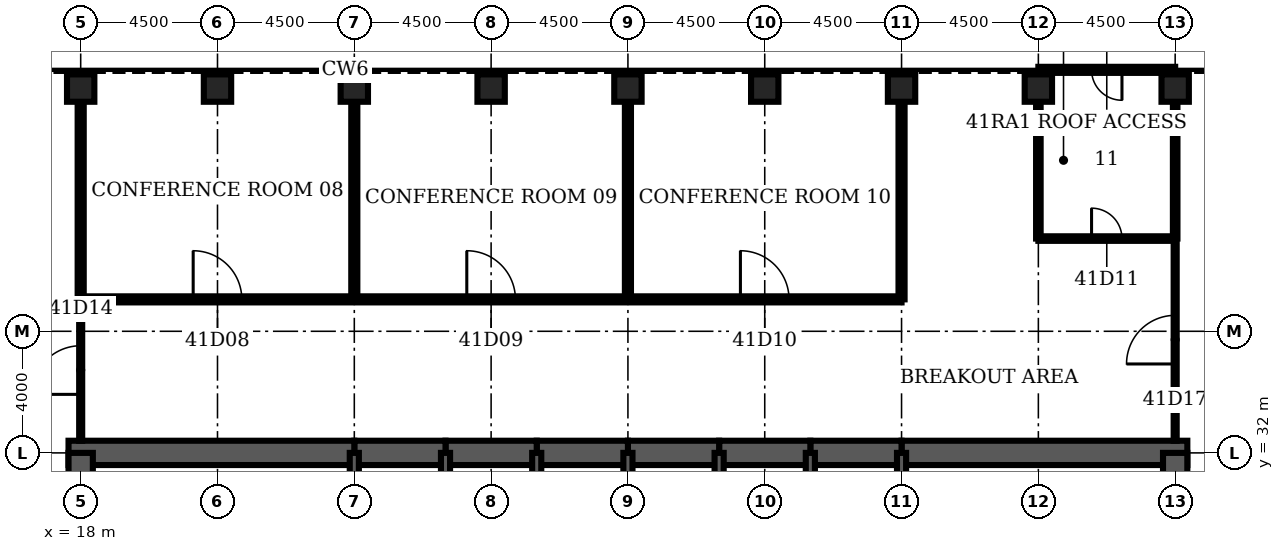
"""IFC4 building model, lengths in metres.
Left out: names, types, materials, properties, quantities, classifications, styles, units other than length and angle.
Written with IfcOpenShell. Run it as: python <this file> out.ifc"""

import sys

from ifc_helpers import new_model, si_unit, direction, frame, frame_2d, origin, origin_2d, place, context, subcontext, project, spatial, rectangle, hollow_rectangle, extrude, element, fill, save


model = new_model("IFC4")
c1 = context("Model", 3, precision=1e-05, world=origin(), true_north=direction((0.0, 1.0)))
c2 = subcontext(c1, "Body", "Model", "MODEL_VIEW")
j1 = project(units=[si_unit("LENGTHUNIT", "METRE"), si_unit("PLANEANGLEUNIT", "RADIAN")], contexts=[c1])
p1 = place(None, origin())
s1 = spatial("IfcSite", under=j1, at=p1, CompositionType="ELEMENT")
p2 = place(p1, origin())
s2 = spatial("IfcBuilding", under=s1, at=p2, CompositionType="ELEMENT")
p3 = place(p2, frame((0.0, 0.0, 185.8)))
s3 = spatial("IfcBuildingStorey", under=s2, at=p3, CompositionType="ELEMENT", Elevation=185.8)
for number, where, z_axis, x_axis in (
    (1, (54.0, 44.0, 0.0), (0.0, 0.0, 1.0), (0.0, 1.0, 0.0)),
    (2, (49.5, 44.0, 0.0), (0.0, 0.0, 1.0), (0.0, 1.0, 0.0)),
    (3, (45.0, 44.0, 0.0), (0.0, 0.0, 1.0), (0.0, 1.0, 0.0)),
    (4, (40.5, 44.0, 0.0), (0.0, 0.0, 1.0), (0.0, 1.0, 0.0)),
    (5, (36.0, 44.0, 0.0), (0.0, 0.0, 1.0), (0.0, 1.0, 0.0)),
    (6, (31.5, 44.0, 0.0), (0.0, 0.0, 1.0), (0.0, 1.0, 0.0)),
    (7, (27.0, 44.0, 0.0), (0.0, 0.0, 1.0), (0.0, 1.0, 0.0)),
    (8, (22.5, 44.0, 0.0), (0.0, 0.0, 1.0), (0.0, 1.0, 0.0)),
    (9, (18.0, 44.0, 0.0), (0.0, 0.0, 1.0), (0.0, 1.0, 0.0)),
):
    element("IfcColumn", number, at=place(p3, frame(where, z_axis=z_axis, x_axis=x_axis)), inside=s3, PredefinedType="COLUMN", context=c2, shape_type="SweptSolid", body=[
        extrude(hollow_rectangle(XDim=0.9, YDim=0.9, WallThickness=0.09, at=origin_2d()), origin(), (0.0, 0.0, 1.0), 4.2),
    ])
p4 = place(p3, frame((54.4, 32.0, 0.0), z_axis=(0.0, 0.0, 1.0), x_axis=(-1.0, 0.0, 0.0)))
e10 = element("IfcWall", 10, at=p4, inside=s3, PredefinedType="SHEAR", context=c2, shape_type="SweptSolid", body=[
    extrude(rectangle(XDim=9.4, YDim=0.8, at=frame_2d((4.7, 0.0))), origin(), (0.0, 0.0, 1.0), 4.2),
])
for number, where, z_axis, x_axis in (
    (11, (45.0, 32.0, 0.0), (0.0, 0.0, 1.0), (-1.0, 0.0, 0.0)),
    (12, (42.0, 32.0, 0.0), (0.0, 0.0, 1.0), (-1.0, 0.0, 0.0)),
    (13, (39.0, 32.0, 0.0), (0.0, 0.0, 1.0), (-1.0, 0.0, 0.0)),
    (14, (36.0, 32.0, 0.0), (0.0, 0.0, 1.0), (-1.0, 0.0, 0.0)),
    (15, (33.0, 32.0, 0.0), (0.0, 0.0, 1.0), (-1.0, 0.0, 0.0)),
    (16, (30.0, 32.0, 0.0), (0.0, 0.0, 1.0), (-1.0, 0.0, 0.0)),
):
    element("IfcWall", number, at=place(p3, frame(where, z_axis=z_axis, x_axis=x_axis)), inside=s3, PredefinedType="SHEAR", context=c2, shape_type="SweptSolid", body=[
        extrude(rectangle(XDim=3.0, YDim=0.8, at=frame_2d((1.5, 0.0))), origin(), (0.0, 0.0, 1.0), 4.2),
    ])
p5 = place(p3, frame((27.0, 32.0, 0.0), z_axis=(0.0, 0.0, 1.0), x_axis=(-1.0, 0.0, 0.0)))
e17 = element("IfcWall", 17, at=p5, inside=s3, PredefinedType="SHEAR", context=c2, shape_type="SweptSolid", body=[
    extrude(rectangle(XDim=9.4, YDim=0.8, at=frame_2d((4.7, 0.0))), origin(), (0.0, 0.0, 1.0), 4.2),
])
for number, where, z_axis, x_axis in (
    (18, (18.0, 32.0, 0.0), (0.0, 0.0, 1.0), (0.0, -1.0, 0.0)),
    (19, (54.0, 28.8, 0.0), (0.0, 0.0, 1.0), (0.0, 1.0, 0.0)),
):
    element("IfcWall", number, at=place(p3, frame(where, z_axis=z_axis, x_axis=x_axis)), inside=s3, PredefinedType="SHEAR", context=c2, shape_type="SweptSolid", body=[
        extrude(rectangle(XDim=3.2, YDim=0.8, at=frame_2d((1.6, 0.0))), origin(), (0.0, 0.0, 1.0), 4.2),
    ])
for number, where, z_axis, x_axis in (
    (20, (27.0, 28.8, 0.0), (0.0, 0.0, 1.0), (0.0, 1.0, 0.0)),
    (21, (30.0, 28.8, 0.0), (0.0, 0.0, 1.0), (0.0, 1.0, 0.0)),
    (22, (33.0, 28.8, 0.0), (0.0, 0.0, 1.0), (0.0, 1.0, 0.0)),
    (23, (36.0, 28.8, 0.0), (0.0, 0.0, 1.0), (0.0, 1.0, 0.0)),
    (24, (39.0, 28.8, 0.0), (0.0, 0.0, 1.0), (0.0, 1.0, 0.0)),
    (25, (42.0, 28.8, 0.0), (0.0, 0.0, 1.0), (0.0, 1.0, 0.0)),
    (26, (45.0, 28.8, 0.0), (0.0, 0.0, 1.0), (0.0, 1.0, 0.0)),
):
    element("IfcWall", number, at=place(p3, frame(where, z_axis=z_axis, x_axis=x_axis)), inside=s3, PredefinedType="SOLIDWALL", context=c2, shape_type="SweptSolid", body=[
        extrude(rectangle(XDim=3.2, YDim=0.3, at=frame_2d((1.6, 0.0))), origin(), (0.0, 0.0, 1.0), 4.2),
    ])
p6 = place(p3, frame((18.0, 37.05, 0.0), z_axis=(0.0, 0.0, 1.0), x_axis=(1.0, 0.0, 0.0)))
e27 = element("IfcWall", 27, at=p6, inside=s3, PredefinedType="PARTITIONING", context=c2, shape_type="SweptSolid", body=[
    extrude(rectangle(XDim=27.0, YDim=0.2, at=frame_2d((13.5, 0.0))), origin(), (0.0, 0.0, 1.0), 3.0),
])
p7 = place(p6, frame((3.7, 0.0, 0.0)))
e28 = element("IfcOpeningElement", 28, at=p7, cuts=e27, PredefinedType="OPENING", context=c2, shape_type="SweptSolid", body=[
    extrude(rectangle(XDim=1.6, YDim=2.1, at=frame_2d((0.8, 1.05))), frame((0.0, 0.11, 0.0), z_axis=(0.0, -1.0, 0.0), x_axis=(1.0, 0.0, 0.0)), (0.0, 0.0, 1.0), 0.22),
])
p8 = place(p6, frame((12.7, 0.0, 0.0)))
e29 = element("IfcOpeningElement", 29, at=p8, cuts=e27, PredefinedType="OPENING", context=c2, shape_type="SweptSolid", body=[
    extrude(rectangle(XDim=1.6, YDim=2.1, at=frame_2d((0.8, 1.05))), frame((0.0, 0.11, 0.0), z_axis=(0.0, -1.0, 0.0), x_axis=(1.0, 0.0, 0.0)), (0.0, 0.0, 1.0), 0.22),
])
p9 = place(p6, frame((21.7, 0.0, 0.0)))
e30 = element("IfcOpeningElement", 30, at=p9, cuts=e27, PredefinedType="OPENING", context=c2, shape_type="SweptSolid", body=[
    extrude(rectangle(XDim=1.6, YDim=2.1, at=frame_2d((0.8, 1.05))), frame((0.0, 0.11, 0.0), z_axis=(0.0, -1.0, 0.0), x_axis=(1.0, 0.0, 0.0)), (0.0, 0.0, 1.0), 0.22),
])
p10 = place(p3, frame((49.5, 39.05, 0.0), z_axis=(0.0, 0.0, 1.0), x_axis=(1.0, 0.0, 0.0)))
e31 = element("IfcWall", 31, at=p10, inside=s3, PredefinedType="PARTITIONING", context=c2, shape_type="SweptSolid", body=[
    extrude(rectangle(XDim=4.5, YDim=0.15, at=frame_2d((2.25, 0.0))), origin(), (0.0, 0.0, 1.0), 3.0),
])
p11 = place(p10, frame((1.75, 0.0, 0.0)))
e32 = element("IfcOpeningElement", 32, at=p11, cuts=e31, PredefinedType="OPENING", context=c2, shape_type="SweptSolid", body=[
    extrude(rectangle(XDim=1.0, YDim=2.1, at=frame_2d((0.5, 1.05))), frame((0.0, 0.085, 0.0), z_axis=(0.0, -1.0, 0.0), x_axis=(1.0, 0.0, 0.0)), (0.0, 0.0, 1.0), 0.17),
])
p12 = place(p3, frame((18.0, 32.4, 0.0), z_axis=(0.0, 0.0, 1.0), x_axis=(0.0, 1.0, 0.0)))
e33 = element("IfcWall", 33, at=p12, inside=s3, PredefinedType="PARTITIONING", context=c2, shape_type="SweptSolid", body=[
    extrude(rectangle(XDim=4.65, YDim=0.1, at=frame_2d((2.325, 0.0))), origin(), (0.0, 0.0, 1.0), 3.0),
])
p13 = place(p12, frame((1.525, 0.0, 0.0)))
e34 = element("IfcOpeningElement", 34, at=p13, cuts=e33, PredefinedType="OPENING", context=c2, shape_type="SweptSolid", body=[
    extrude(rectangle(XDim=1.6, YDim=2.1, at=frame_2d((0.8, 1.05))), frame((0.0, 0.06, 0.0), z_axis=(0.0, -1.0, 0.0), x_axis=(1.0, 0.0, 0.0)), (0.0, 0.0, 1.0), 0.12),
])
for number, where, z_axis, x_axis in (
    (35, (18.0, 37.05, 0.0), (0.0, 0.0, 1.0), (0.0, 1.0, 0.0)),
    (36, (27.0, 37.05, 0.0), (0.0, 0.0, 1.0), (0.0, 1.0, 0.0)),
    (37, (36.0, 37.05, 0.0), (0.0, 0.0, 1.0), (0.0, 1.0, 0.0)),
    (38, (45.0, 37.05, 0.0), (0.0, 0.0, 1.0), (0.0, 1.0, 0.0)),
):
    element("IfcWall", number, at=place(p3, frame(where, z_axis=z_axis, x_axis=x_axis)), inside=s3, PredefinedType="PARTITIONING", context=c2, shape_type="SweptSolid", body=[
        extrude(rectangle(XDim=6.5, YDim=0.2, at=frame_2d((3.25, 0.0))), origin(), (0.0, 0.0, 1.0), 3.0),
    ])
p14 = place(p3, frame((49.5, 39.05, 0.0), z_axis=(0.0, 0.0, 1.0), x_axis=(0.0, 1.0, 0.0)))
e39 = element("IfcWall", 39, at=p14, inside=s3, PredefinedType="PARTITIONING", context=c2, shape_type="SweptSolid", body=[
    extrude(rectangle(XDim=4.5, YDim=0.15, at=frame_2d((2.25, 0.0))), origin(), (0.0, 0.0, 1.0), 3.0),
])
p15 = place(p3, frame((54.0, 32.4, 0.0), z_axis=(0.0, 0.0, 1.0), x_axis=(0.0, 1.0, 0.0)))
e40 = element("IfcWall", 40, at=p15, inside=s3, PredefinedType="PARTITIONING", context=c2, shape_type="SweptSolid", body=[
    extrude(rectangle(XDim=6.65, YDim=0.1, at=frame_2d((3.325, 0.0))), origin(), (0.0, 0.0, 1.0), 3.0),
])
p16 = place(p15, frame((2.525, 0.0, 0.0)))
e41 = element("IfcOpeningElement", 41, at=p16, cuts=e40, PredefinedType="OPENING", context=c2, shape_type="SweptSolid", body=[
    extrude(rectangle(XDim=1.6, YDim=2.1, at=frame_2d((0.8, 1.05))), frame((0.0, 0.06, 0.0), z_axis=(0.0, -1.0, 0.0), x_axis=(1.0, 0.0, 0.0)), (0.0, 0.0, 1.0), 0.12),
])
p17 = place(p3, frame((54.0, 39.05, 0.0), z_axis=(0.0, 0.0, 1.0), x_axis=(0.0, 1.0, 0.0)))
e42 = element("IfcWall", 42, at=p17, inside=s3, PredefinedType="PARTITIONING", context=c2, shape_type="SweptSolid", body=[
    extrude(rectangle(XDim=4.5, YDim=0.15, at=frame_2d((2.25, 0.0))), origin(), (0.0, 0.0, 1.0), 3.0),
])
p18 = place(p3, frame((54.0, 44.6, 0.0), z_axis=(0.0, 0.0, 1.0), x_axis=(-1.0, 0.0, 0.0)))
e43 = element("IfcWall", 43, at=p18, inside=s3, PredefinedType="SOLIDWALL", context=c2, shape_type="SweptSolid", body=[
    extrude(rectangle(XDim=4.5, YDim=0.2, at=frame_2d((2.25, 0.0))), origin(), (0.0, 0.0, 1.0), 4.04),
])
p19 = place(p18, frame((1.75, 0.0, 0.0)))
e44 = element("IfcOpeningElement", 44, at=p19, cuts=e43, PredefinedType="OPENING", context=c2, shape_type="SweptSolid", body=[
    extrude(rectangle(XDim=1.0, YDim=2.1, at=frame_2d((0.5, 1.05))), frame((0.0, 0.11, 0.0), z_axis=(0.0, -1.0, 0.0), x_axis=(1.0, 0.0, 0.0)), (0.0, 0.0, 1.0), 0.22),
])
p20 = place(p7, origin())
e45 = element("IfcDoor", 45, at=p20, inside=s3, OperationType="SINGLE_SWING_LEFT", PredefinedType="DOOR", context=c2, shape_type="SweptSolid", body=[
    extrude(rectangle(XDim=1.6, YDim=2.1, at=frame_2d((0.8, 1.05))), frame((0.0, 0.025, 0.0), z_axis=(0.0, -1.0, 0.0), x_axis=(1.0, 0.0, 0.0)), (0.0, 0.0, 1.0), 0.05),
])
fill(e28, e45)
p21 = place(p8, origin())
e46 = element("IfcDoor", 46, at=p21, inside=s3, OperationType="SINGLE_SWING_LEFT", PredefinedType="DOOR", context=c2, shape_type="SweptSolid", body=[
    extrude(rectangle(XDim=1.6, YDim=2.1, at=frame_2d((0.8, 1.05))), frame((0.0, 0.025, 0.0), z_axis=(0.0, -1.0, 0.0), x_axis=(1.0, 0.0, 0.0)), (0.0, 0.0, 1.0), 0.05),
])
fill(e29, e46)
p22 = place(p9, origin())
e47 = element("IfcDoor", 47, at=p22, inside=s3, OperationType="SINGLE_SWING_LEFT", PredefinedType="DOOR", context=c2, shape_type="SweptSolid", body=[
    extrude(rectangle(XDim=1.6, YDim=2.1, at=frame_2d((0.8, 1.05))), frame((0.0, 0.025, 0.0), z_axis=(0.0, -1.0, 0.0), x_axis=(1.0, 0.0, 0.0)), (0.0, 0.0, 1.0), 0.05),
])
fill(e30, e47)
p23 = place(p11, origin())
e48 = element("IfcDoor", 48, at=p23, inside=s3, OperationType="SINGLE_SWING_LEFT", PredefinedType="DOOR", context=c2, shape_type="SweptSolid", body=[
    extrude(rectangle(XDim=1.0, YDim=2.1, at=frame_2d((0.5, 1.05))), frame((0.0, 0.025, 0.0), z_axis=(0.0, -1.0, 0.0), x_axis=(1.0, 0.0, 0.0)), (0.0, 0.0, 1.0), 0.05),
])
fill(e32, e48)
p24 = place(p13, origin())
e49 = element("IfcDoor", 49, at=p24, inside=s3, OperationType="SINGLE_SWING_LEFT", PredefinedType="DOOR", context=c2, shape_type="SweptSolid", body=[
    extrude(rectangle(XDim=1.6, YDim=2.1, at=frame_2d((0.8, 1.05))), frame((0.0, 0.025, 0.0), z_axis=(0.0, -1.0, 0.0), x_axis=(1.0, 0.0, 0.0)), (0.0, 0.0, 1.0), 0.05),
])
fill(e34, e49)
p25 = place(p16, origin())
e50 = element("IfcDoor", 50, at=p25, inside=s3, OperationType="SINGLE_SWING_LEFT", PredefinedType="DOOR", context=c2, shape_type="SweptSolid", body=[
    extrude(rectangle(XDim=1.6, YDim=2.1, at=frame_2d((0.8, 1.05))), frame((0.0, 0.025, 0.0), z_axis=(0.0, -1.0, 0.0), x_axis=(1.0, 0.0, 0.0)), (0.0, 0.0, 1.0), 0.05),
])
fill(e41, e50)
p26 = place(p19, origin())
e51 = element("IfcDoor", 51, at=p26, inside=s3, OperationType="SINGLE_SWING_LEFT", PredefinedType="DOOR", context=c2, shape_type="SweptSolid", body=[
    extrude(rectangle(XDim=1.0, YDim=2.1, at=frame_2d((0.5, 1.05))), frame((0.0, 0.025, 0.0), z_axis=(0.0, -1.0, 0.0), x_axis=(1.0, 0.0, 0.0)), (0.0, 0.0, 1.0), 0.05),
])
fill(e44, e51)
save(model, sys.argv[1])
